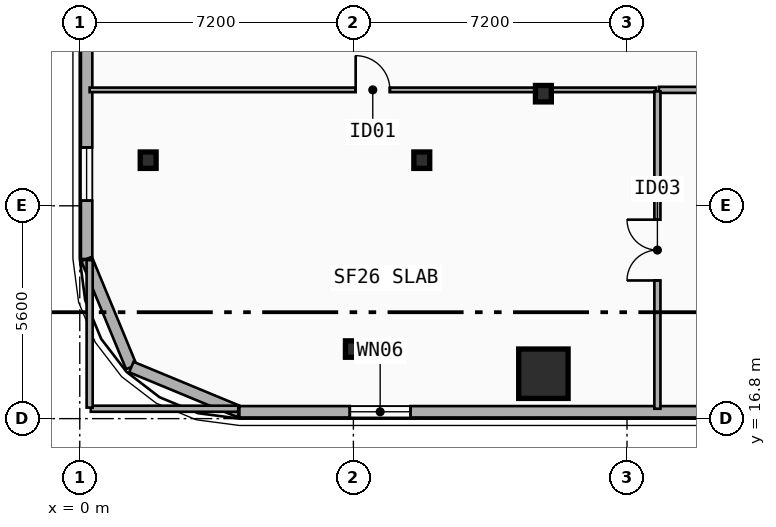
"""IFC4 building model, lengths in metres.
Left out: names, types, materials, properties, quantities, classifications, styles, units other than length and angle.
Written with IfcOpenShell. Run it as: python <this file> out.ifc"""

import sys

from ifc_helpers import new_model, si_unit, direction, frame, frame_2d, origin, origin_2d, place, context, subcontext, project, spatial, rectangle, i_section, extrude, element, fill, save


model = new_model("IFC4")
c1 = context("Model", 3, precision=1e-05, world=origin(), true_north=direction((0.0, 1.0)))
c2 = subcontext(c1, "Body", "Model", "MODEL_VIEW")
j1 = project(units=[si_unit("LENGTHUNIT", "METRE"), si_unit("PLANEANGLEUNIT", "RADIAN")], contexts=[c1])
p1 = place(None, origin())
s1 = spatial("IfcSite", under=j1, at=p1, CompositionType="ELEMENT")
p2 = place(p1, origin())
s2 = spatial("IfcBuilding", under=s1, at=p2, CompositionType="ELEMENT")
p3 = place(p2, frame((0.0, 0.0, 89.8)))
s3 = spatial("IfcBuildingStorey", under=s2, at=p3, CompositionType="ELEMENT", Elevation=89.8)
p4 = place(p3, frame((12.2, 25.35, 0.0), z_axis=(0.0, 0.0, 1.0), x_axis=(1.0, 0.0, 0.0)))
e1 = element("IfcColumn", 1, at=p4, inside=s3, PredefinedType="COLUMN", context=c2, shape_type="SweptSolid", body=[
    extrude(i_section(OverallWidth=0.418, OverallDepth=0.432, WebThickness=0.035, FlangeThickness=0.056, FilletRadius=0.015, at=origin_2d()), origin(), (0.0, 0.0, 1.0), 4.5),
])
p5 = place(p3, frame((12.2, 18.09, 0.0), z_axis=(0.0, -0.090233693293, 0.995920619625), x_axis=(1.0, 0.0, 0.0)))
e2 = element("IfcColumn", 2, at=p5, inside=s3, PredefinedType="COLUMN", context=c2, shape_type="SweptSolid", body=[
    extrude(rectangle(XDim=1.3, YDim=1.3, at=origin_2d()), origin(), (0.0, 0.0, 1.0), 4.518),
])
for number, where, z_axis, x_axis in (
    (3, (9.0, 23.6, 0.0), (0.0, 0.0, 1.0), (1.0, 0.0, 0.0)),
    (4, (1.8, 23.6, 0.0), (0.0, 0.0, 1.0), (1.0, 0.0, 0.0)),
):
    element("IfcColumn", number, at=place(p3, frame(where, z_axis=z_axis, x_axis=x_axis)), inside=s3, PredefinedType="COLUMN", context=c2, shape_type="SweptSolid", body=[
        extrude(i_section(OverallWidth=0.418, OverallDepth=0.432, WebThickness=0.035, FlangeThickness=0.056, FilletRadius=0.015, at=origin_2d()), origin(), (0.0, 0.0, 1.0), 4.5),
    ])
p6 = place(p3, frame((7.2, 18.727, 0.0), z_axis=(0.0, -0.079876337942, 0.996804780605), x_axis=(1.0, 0.0, 0.0)))
e5 = element("IfcColumn", 5, at=p6, inside=s3, PredefinedType="COLUMN", context=c2, shape_type="SweptSolid", body=[
    extrude(i_section(OverallWidth=0.418, OverallDepth=0.432, WebThickness=0.035, FlangeThickness=0.056, FilletRadius=0.015, at=origin_2d()), origin(), (0.0, 0.0, 1.0), 4.514),
])
p7 = place(p3, frame((0.18, 21.0, 0.0), z_axis=(0.0, 0.0, 1.0), x_axis=(0.0, 1.0, 0.0)))
e6 = element("IfcWall", 6, at=p7, inside=s3, PredefinedType="SOLIDWALL", context=c2, shape_type="SweptSolid", body=[
    extrude(rectangle(XDim=18.0, YDim=0.3, at=frame_2d((9.0, 0.0))), origin(), (0.0, 0.0, 1.0), 4.24),
])
p8 = place(p7, frame((1.535, 0.0, 0.85)))
e7 = element("IfcOpeningElement", 7, at=p8, cuts=e6, PredefinedType="OPENING", context=c2, shape_type="SweptSolid", body=[
    extrude(rectangle(XDim=1.4, YDim=1.8, at=frame_2d((0.7, 0.9))), frame((0.0, 0.16, 0.0), z_axis=(0.0, -1.0, 0.0), x_axis=(1.0, 0.0, 0.0)), (0.0, 0.0, 1.0), 0.32),
])
p9 = place(p7, frame((9.56, 0.0, 0.85)))
e8 = element("IfcOpeningElement", 8, at=p9, cuts=e6, PredefinedType="OPENING", context=c2, shape_type="SweptSolid", body=[
    extrude(rectangle(XDim=1.4, YDim=1.8, at=frame_2d((0.7, 0.9))), frame((0.0, 0.16, 0.0), z_axis=(0.0, -1.0, 0.0), x_axis=(1.0, 0.0, 0.0)), (0.0, 0.0, 1.0), 0.32),
])
p10 = place(p7, frame((13.62, 0.0, 0.85)))
e9 = element("IfcOpeningElement", 9, at=p10, cuts=e6, PredefinedType="OPENING", context=c2, shape_type="SweptSolid", body=[
    extrude(rectangle(XDim=1.4, YDim=1.8, at=frame_2d((0.7, 0.9))), frame((0.0, 0.16, 0.0), z_axis=(0.0, -1.0, 0.0), x_axis=(1.0, 0.0, 0.0)), (0.0, 0.0, 1.0), 0.32),
])
for number, where, z_axis, x_axis in (
    (10, (1.357, 18.157, 0.0), (0.0, 0.0, 1.0), (-0.383, 0.924, 0.0)),
    (11, (4.2, 16.98, 0.0), (0.0, 0.0, 1.0), (-0.924, 0.383, 0.0)),
):
    element("IfcWall", number, at=place(p3, frame(where, z_axis=z_axis, x_axis=x_axis)), inside=s3, PredefinedType="SOLIDWALL", context=c2, shape_type="SweptSolid", body=[
        extrude(rectangle(XDim=3.077, YDim=0.3, at=frame_2d((1.538, 0.0))), origin(), (0.0, 0.0, 1.0), 4.24),
    ])
p11 = place(p3, frame((53.4, 16.98, 0.0), z_axis=(0.0, 0.0, 1.0), x_axis=(-1.0, 0.0, 0.0)))
e12 = element("IfcWall", 12, at=p11, inside=s3, PredefinedType="SOLIDWALL", context=c2, shape_type="SweptSolid", body=[
    extrude(rectangle(XDim=49.2, YDim=0.3, at=frame_2d((24.6, 0.0))), origin(), (0.0, 0.0, 1.0), 4.24),
])
p12 = place(p11, frame((44.695, 0.0, 0.8)))
e13 = element("IfcOpeningElement", 13, at=p12, cuts=e12, PredefinedType="OPENING", context=c2, shape_type="SweptSolid", body=[
    extrude(rectangle(XDim=1.6, YDim=1.95, at=frame_2d((0.8, 0.975))), frame((0.0, 0.16, 0.0), z_axis=(0.0, -1.0, 0.0), x_axis=(1.0, 0.0, 0.0)), (0.0, 0.0, 1.0), 0.32),
])
p13 = place(p11, frame((33.01, 0.0, 0.65)))
e14 = element("IfcOpeningElement", 14, at=p13, cuts=e12, PredefinedType="OPENING", context=c2, shape_type="SweptSolid", body=[
    extrude(rectangle(XDim=1.6, YDim=1.95, at=frame_2d((0.8, 0.975))), frame((0.0, 0.16, 0.0), z_axis=(0.0, -1.0, 0.0), x_axis=(1.0, 0.0, 0.0)), (0.0, 0.0, 1.0), 0.32),
])
p14 = place(p11, frame((20.495, 0.0, 0.8)))
e15 = element("IfcOpeningElement", 15, at=p14, cuts=e12, PredefinedType="OPENING", context=c2, shape_type="SweptSolid", body=[
    extrude(rectangle(XDim=1.6, YDim=1.95, at=frame_2d((0.8, 0.975))), frame((0.0, 0.16, 0.0), z_axis=(0.0, -1.0, 0.0), x_axis=(1.0, 0.0, 0.0)), (0.0, 0.0, 1.0), 0.32),
])
p15 = place(p11, frame((8.91, 0.0, 0.65)))
e16 = element("IfcOpeningElement", 16, at=p15, cuts=e12, PredefinedType="OPENING", context=c2, shape_type="SweptSolid", body=[
    extrude(rectangle(XDim=1.6, YDim=1.95, at=frame_2d((0.8, 0.975))), frame((0.0, 0.16, 0.0), z_axis=(0.0, -1.0, 0.0), x_axis=(1.0, 0.0, 0.0)), (0.0, 0.0, 1.0), 0.32),
])
p16 = place(p11, frame((2.905, 0.0, 0.8)))
e17 = element("IfcOpeningElement", 17, at=p16, cuts=e12, PredefinedType="OPENING", context=c2, shape_type="SweptSolid", body=[
    extrude(rectangle(XDim=1.6, YDim=1.95, at=frame_2d((0.8, 0.975))), frame((0.0, 0.16, 0.0), z_axis=(0.0, -1.0, 0.0), x_axis=(1.0, 0.0, 0.0)), (0.0, 0.0, 1.0), 0.32),
])
p17 = place(p3, frame((0.26, 25.45, 0.0), z_axis=(0.0, 0.0, 1.0), x_axis=(1.0, 0.0, 0.0)))
e18 = element("IfcWall", 18, at=p17, inside=s3, PredefinedType="PARTITIONING", context=c2, shape_type="SweptSolid", body=[
    extrude(rectangle(XDim=14.9, YDim=0.12, at=frame_2d((7.45, 0.0))), origin(), (0.0, 0.0, 1.0), 3.31),
])
p18 = place(p17, frame((7.0, 0.0, 0.0)))
e19 = element("IfcOpeningElement", 19, at=p18, cuts=e18, PredefinedType="OPENING", context=c2, shape_type="SweptSolid", body=[
    extrude(rectangle(XDim=0.9, YDim=2.1, at=frame_2d((0.45, 1.05))), frame((0.0, 0.07, 0.0), z_axis=(0.0, -1.0, 0.0), x_axis=(1.0, 0.0, 0.0)), (0.0, 0.0, 1.0), 0.14),
])
p19 = place(p3, frame((15.24, 25.45, 0.0), z_axis=(0.0, 0.0, 1.0), x_axis=(1.0, 0.0, 0.0)))
e20 = element("IfcWall", 20, at=p19, inside=s3, PredefinedType="PARTITIONING", context=c2, shape_type="SweptSolid", body=[
    extrude(rectangle(XDim=7.52, YDim=0.16, at=frame_2d((3.76, 0.0))), origin(), (0.0, 0.0, 1.0), 3.31),
])
p20 = place(p19, frame((3.26, 0.0, 0.0)))
e21 = element("IfcOpeningElement", 21, at=p20, cuts=e20, PredefinedType="OPENING", context=c2, shape_type="SweptSolid", body=[
    extrude(rectangle(XDim=1.0, YDim=2.15, at=frame_2d((0.5, 1.075))), frame((0.0, 0.09, 0.0), z_axis=(0.0, -1.0, 0.0), x_axis=(1.0, 0.0, 0.0)), (0.0, 0.0, 1.0), 0.18),
])
p21 = place(p3, frame((15.2, 17.06, 0.0), z_axis=(0.0, 0.0, 1.0), x_axis=(0.0, 1.0, 0.0)))
e22 = element("IfcWall", 22, at=p21, inside=s3, PredefinedType="PARTITIONING", context=c2, shape_type="SweptSolid", body=[
    extrude(rectangle(XDim=8.35, YDim=0.16, at=frame_2d((4.175, 0.0))), origin(), (0.0, 0.0, 1.0), 3.72),
])
p22 = place(p21, frame((3.375, 0.0, 0.0)))
e23 = element("IfcOpeningElement", 23, at=p22, cuts=e22, PredefinedType="OPENING", context=c2, shape_type="SweptSolid", body=[
    extrude(rectangle(XDim=1.6, YDim=2.2, at=frame_2d((0.8, 1.1))), frame((0.0, 0.09, 0.0), z_axis=(0.0, -1.0, 0.0), x_axis=(1.0, 0.0, 0.0)), (0.0, 0.0, 1.0), 0.18),
])
for number, where, z_axis, x_axis in (
    (24, (0.29, 17.06, 0.0), (0.0, 0.0, 1.0), (1.0, 0.0, 0.0)),
    (25, (0.26, 17.09, 0.0), (0.0, 0.0, 1.0), (0.0, 1.0, 0.0)),
):
    element("IfcWall", number, at=place(p3, frame(where, z_axis=z_axis, x_axis=x_axis)), inside=s3, PredefinedType="PARTITIONING", context=c2, shape_type="SweptSolid", body=[
        extrude(rectangle(XDim=3.88, YDim=0.16, at=frame_2d((1.94, 0.0))), origin(), (0.0, 0.0, 1.0), 4.24),
    ])
p23 = place(p8, origin())
e26 = element("IfcWindow", 26, at=p23, inside=s3, PartitioningType="SINGLE_PANEL", PredefinedType="WINDOW", context=c2, shape_type="SweptSolid", body=[
    extrude(rectangle(XDim=1.4, YDim=1.8, at=frame_2d((0.7, 0.9))), frame((0.0, 0.03, 0.0), z_axis=(0.0, -1.0, 0.0), x_axis=(1.0, 0.0, 0.0)), (0.0, 0.0, 1.0), 0.06),
])
fill(e7, e26)
p24 = place(p12, origin())
e27 = element("IfcWindow", 27, at=p24, inside=s3, PartitioningType="SINGLE_PANEL", PredefinedType="WINDOW", context=c2, shape_type="SweptSolid", body=[
    extrude(rectangle(XDim=1.6, YDim=1.95, at=frame_2d((0.8, 0.975))), frame((0.0, 0.03, 0.0), z_axis=(0.0, -1.0, 0.0), x_axis=(1.0, 0.0, 0.0)), (0.0, 0.0, 1.0), 0.06),
])
fill(e13, e27)
p25 = place(p18, origin())
e28 = element("IfcDoor", 28, at=p25, inside=s3, OperationType="SINGLE_SWING_LEFT", PredefinedType="DOOR", context=c2, shape_type="SweptSolid", body=[
    extrude(rectangle(XDim=0.9, YDim=2.1, at=frame_2d((0.45, 1.05))), frame((0.0, 0.025, 0.0), z_axis=(0.0, -1.0, 0.0), x_axis=(1.0, 0.0, 0.0)), (0.0, 0.0, 1.0), 0.05),
])
fill(e19, e28)
p26 = place(p22, origin())
e29 = element("IfcDoor", 29, at=p26, inside=s3, OperationType="SINGLE_SWING_LEFT", PredefinedType="DOOR", context=c2, shape_type="SweptSolid", body=[
    extrude(rectangle(XDim=1.6, YDim=2.2, at=frame_2d((0.8, 1.1))), frame((0.0, 0.025, 0.0), z_axis=(0.0, -1.0, 0.0), x_axis=(1.0, 0.0, 0.0)), (0.0, 0.0, 1.0), 0.05),
])
fill(e23, e29)
save(model, sys.argv[1])
